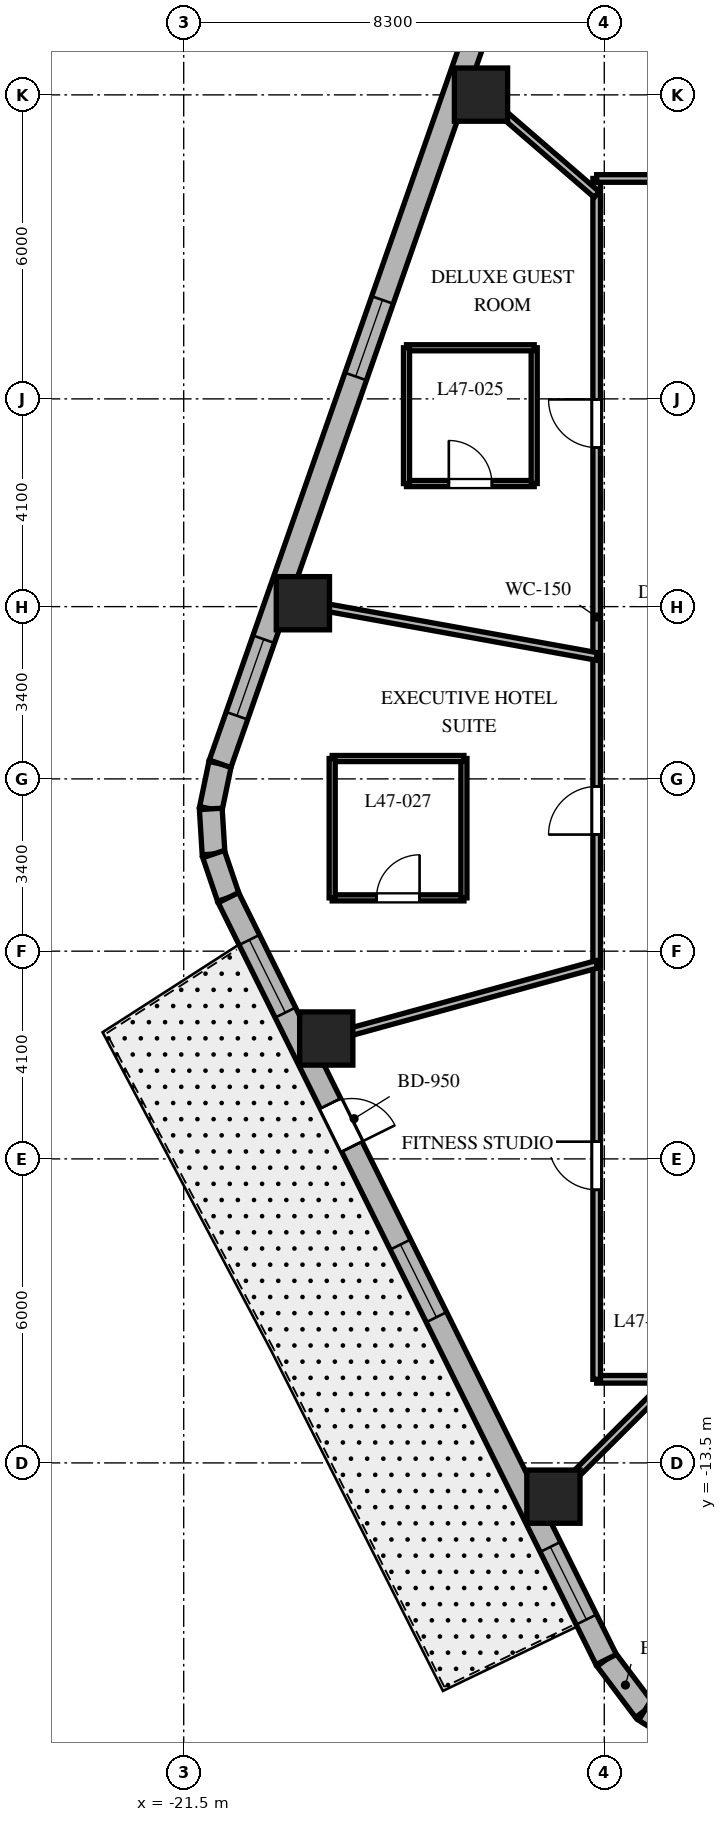
"""IFC4 building model, lengths in metres.
Left out: names, types, materials, properties, quantities, classifications, styles, units other than length and angle.
Written with IfcOpenShell. Run it as: python <this file> out.ifc"""

import sys

from ifc_helpers import new_model, si_unit, direction, frame, frame_2d, origin, origin_2d, place, context, subcontext, project, spatial, rectangle, extrude, element, fill, save


model = new_model("IFC4")
c1 = context("Model", 3, precision=1e-05, world=origin(), true_north=direction((0.0, 1.0)))
c2 = subcontext(c1, "Body", "Model", "MODEL_VIEW")
j1 = project(units=[si_unit("LENGTHUNIT", "METRE"), si_unit("PLANEANGLEUNIT", "RADIAN")], contexts=[c1])
p1 = place(None, origin())
s1 = spatial("IfcSite", under=j1, at=p1, CompositionType="ELEMENT")
p2 = place(p1, origin())
s2 = spatial("IfcBuilding", under=s1, at=p2, CompositionType="ELEMENT")
p3 = place(p2, frame((0.0, 0.0, 190.4)))
s3 = spatial("IfcBuildingStorey", under=s2, at=p3, CompositionType="ELEMENT", Elevation=190.4)
for number, where, z_axis, x_axis in (
    (1, (-15.633, 13.505, 0.0), (0.0, 0.0, 1.0), (1.0, 0.0, 0.0)),
    (2, (-19.148, 3.467, 0.0), (0.0, 0.0, 1.0), (1.0, 0.0, 0.0)),
    (3, (-18.687, -5.124, 0.0), (0.0, 0.0, 1.0), (1.0, 0.0, 0.0)),
    (4, (-14.204, -14.166, 0.0), (0.0, 0.0, 1.0), (1.0, 0.0, 0.0)),
):
    element("IfcColumn", number, at=place(p3, frame(where, z_axis=z_axis, x_axis=x_axis)), inside=s3, PredefinedType="COLUMN", context=c2, shape_type="SweptSolid", body=[
        extrude(rectangle(XDim=1.05, YDim=1.05, at=origin_2d()), origin(), (0.0, 0.0, 1.0), 3.7),
    ])
p4 = place(p3, frame((-13.162, -17.381, 0.0), z_axis=(0.0, 0.0, 1.0), x_axis=(0.601515770517, -0.798860925205, 0.0)))
e5 = element("IfcWall", 5, at=p4, inside=s3, PredefinedType="SOLIDWALL", context=c2, shape_type="SweptSolid", body=[
    extrude(rectangle(XDim=1.262, YDim=0.45, at=frame_2d((0.631, 0.0))), origin(), (0.0, 0.0, 1.0), 3.4),
])
p5 = place(p3, frame((-12.403, -18.389, 0.0), z_axis=(0.0, 0.0, 1.0), x_axis=(0.849795170926, -0.527113049991, 0.0)))
e6 = element("IfcWall", 6, at=p5, inside=s3, PredefinedType="SOLIDWALL", context=c2, shape_type="SweptSolid", body=[
    extrude(rectangle(XDim=1.241, YDim=0.45, at=frame_2d((0.62, 0.0))), origin(), (0.0, 0.0, 1.0), 3.4),
])
p6 = place(p3, frame((-20.782, 0.298, 0.0), z_axis=(0.0, 0.0, 1.0), x_axis=(-0.202570068411, -0.979267771033, 0.0)))
e7 = element("IfcWall", 7, at=p6, inside=s3, PredefinedType="SOLIDWALL", context=c2, shape_type="SweptSolid", body=[
    extrude(rectangle(XDim=0.909, YDim=0.45, at=frame_2d((0.454, 0.0))), origin(), (0.0, 0.0, 1.0), 3.4),
])
p7 = place(p3, frame((-20.966, -0.592, 0.0), z_axis=(0.0, 0.0, 1.0), x_axis=(0.061748898935, -0.998091715966, 0.0)))
e8 = element("IfcWall", 8, at=p7, inside=s3, PredefinedType="SOLIDWALL", context=c2, shape_type="SweptSolid", body=[
    extrude(rectangle(XDim=0.894, YDim=0.45, at=frame_2d((0.447, 0.0))), origin(), (0.0, 0.0, 1.0), 3.4),
])
p8 = place(p3, frame((-20.911, -1.484, 0.0), z_axis=(0.0, 0.0, 1.0), x_axis=(0.321623334353, -0.946867694453, 0.0)))
e9 = element("IfcWall", 9, at=p8, inside=s3, PredefinedType="SOLIDWALL", context=c2, shape_type="SweptSolid", body=[
    extrude(rectangle(XDim=0.909, YDim=0.45, at=frame_2d((0.454, 0.0))), origin(), (0.0, 0.0, 1.0), 3.4),
])
p9 = place(p3, frame((-14.937, 16.993, 0.0), z_axis=(0.0, 0.0, 1.0), x_axis=(-0.330431575061, -0.943829949834, 0.0)))
e10 = element("IfcWall", 10, at=p9, inside=s3, PredefinedType="SOLIDWALL", context=c2, shape_type="SweptSolid", body=[
    extrude(rectangle(XDim=17.689, YDim=0.45, at=frame_2d((8.844, 0.0))), origin(), (0.0, 0.0, 1.0), 3.4),
])
p10 = place(p9, frame((0.95, 0.0, 0.8)))
e11 = element("IfcOpeningElement", 11, at=p10, cuts=e10, PredefinedType="OPENING", context=c2, shape_type="SweptSolid", body=[
    extrude(rectangle(XDim=1.6, YDim=1.75, at=frame_2d((0.8, 0.875))), frame((0.0, 0.235, 0.0), z_axis=(0.0, -1.0, 0.0), x_axis=(1.0, 0.0, 0.0)), (0.0, 0.0, 1.0), 0.47),
])
p11 = place(p9, frame((7.99, 0.0, 0.8)))
e12 = element("IfcOpeningElement", 12, at=p11, cuts=e10, PredefinedType="OPENING", context=c2, shape_type="SweptSolid", body=[
    extrude(rectangle(XDim=1.6, YDim=1.75, at=frame_2d((0.8, 0.875))), frame((0.0, 0.235, 0.0), z_axis=(0.0, -1.0, 0.0), x_axis=(1.0, 0.0, 0.0)), (0.0, 0.0, 1.0), 0.47),
])
p12 = place(p9, frame((15.084, 0.0, 0.8)))
e13 = element("IfcOpeningElement", 13, at=p12, cuts=e10, PredefinedType="OPENING", context=c2, shape_type="SweptSolid", body=[
    extrude(rectangle(XDim=1.6, YDim=1.75, at=frame_2d((0.8, 0.875))), frame((0.0, 0.235, 0.0), z_axis=(0.0, -1.0, 0.0), x_axis=(1.0, 0.0, 0.0)), (0.0, 0.0, 1.0), 0.47),
])
p13 = place(p3, frame((-20.618, -2.344, 0.0), z_axis=(0.0, 0.0, 1.0), x_axis=(0.444243691097, -0.895905990002, 0.0)))
e14 = element("IfcWall", 14, at=p13, inside=s3, PredefinedType="SOLIDWALL", context=c2, shape_type="SweptSolid", body=[
    extrude(rectangle(XDim=16.784, YDim=0.45, at=frame_2d((8.392, 0.0))), origin(), (0.0, 0.0, 1.0), 3.4),
])
p14 = place(p13, frame((4.535, 0.0, 0.0)))
e15 = element("IfcOpeningElement", 15, at=p14, cuts=e14, PredefinedType="OPENING", context=c2, shape_type="SweptSolid", body=[
    extrude(rectangle(XDim=0.95, YDim=2.15, at=frame_2d((0.475, 1.075))), frame((0.0, 0.235, 0.0), z_axis=(0.0, -1.0, 0.0), x_axis=(1.0, 0.0, 0.0)), (0.0, 0.0, 1.0), 0.47),
])
p15 = place(p13, frame((0.931, 0.0, 0.8)))
e16 = element("IfcOpeningElement", 16, at=p15, cuts=e14, PredefinedType="OPENING", context=c2, shape_type="SweptSolid", body=[
    extrude(rectangle(XDim=1.6, YDim=1.75, at=frame_2d((0.8, 0.875))), frame((0.0, 0.235, 0.0), z_axis=(0.0, -1.0, 0.0), x_axis=(1.0, 0.0, 0.0)), (0.0, 0.0, 1.0), 0.47),
])
p16 = place(p13, frame((7.642, 0.0, 0.8)))
e17 = element("IfcOpeningElement", 17, at=p16, cuts=e14, PredefinedType="OPENING", context=c2, shape_type="SweptSolid", body=[
    extrude(rectangle(XDim=1.6, YDim=1.75, at=frame_2d((0.8, 0.875))), frame((0.0, 0.235, 0.0), z_axis=(0.0, -1.0, 0.0), x_axis=(1.0, 0.0, 0.0)), (0.0, 0.0, 1.0), 0.47),
])
p17 = place(p13, frame((14.303, 0.0, 0.8)))
e18 = element("IfcOpeningElement", 18, at=p17, cuts=e14, PredefinedType="OPENING", context=c2, shape_type="SweptSolid", body=[
    extrude(rectangle(XDim=1.6, YDim=1.75, at=frame_2d((0.8, 0.875))), frame((0.0, 0.235, 0.0), z_axis=(0.0, -1.0, 0.0), x_axis=(1.0, 0.0, 0.0)), (0.0, 0.0, 1.0), 0.47),
])
p18 = place(p3, frame((13.35, -11.85, 0.0), z_axis=(0.0, 0.0, 1.0), x_axis=(-1.0, 0.0, 0.0)))
e19 = element("IfcWall", 19, at=p18, inside=s3, PredefinedType="PARTITIONING", context=c2, shape_type="SweptSolid", body=[
    extrude(rectangle(XDim=26.7, YDim=0.15, at=frame_2d((13.35, 0.0))), origin(), (0.0, 0.0, 1.0), 2.84),
])
p19 = place(p18, frame((22.459, 0.0, 0.0)))
e20 = element("IfcOpeningElement", 20, at=p19, cuts=e19, PredefinedType="OPENING", context=c2, shape_type="SweptSolid", body=[
    extrude(rectangle(XDim=0.9, YDim=2.03, at=frame_2d((0.45, 1.015))), frame((0.0, 0.085, 0.0), z_axis=(0.0, -1.0, 0.0), x_axis=(1.0, 0.0, 0.0)), (0.0, 0.0, 1.0), 0.17),
])
p20 = place(p18, frame((18.304, 0.0, 0.0)))
e21 = element("IfcOpeningElement", 21, at=p20, cuts=e19, PredefinedType="OPENING", context=c2, shape_type="SweptSolid", body=[
    extrude(rectangle(XDim=0.9, YDim=2.03, at=frame_2d((0.45, 1.015))), frame((0.0, 0.085, 0.0), z_axis=(0.0, -1.0, 0.0), x_axis=(1.0, 0.0, 0.0)), (0.0, 0.0, 1.0), 0.17),
])
p21 = place(p18, frame((12.362, 0.0, 0.0)))
e22 = element("IfcOpeningElement", 22, at=p21, cuts=e19, PredefinedType="OPENING", context=c2, shape_type="SweptSolid", body=[
    extrude(rectangle(XDim=0.95, YDim=2.03, at=frame_2d((0.475, 1.015))), frame((0.0, 0.085, 0.0), z_axis=(0.0, -1.0, 0.0), x_axis=(1.0, 0.0, 0.0)), (0.0, 0.0, 1.0), 0.17),
])
p22 = place(p18, frame((3.995, 0.0, 0.0)))
e23 = element("IfcOpeningElement", 23, at=p22, cuts=e19, PredefinedType="OPENING", context=c2, shape_type="SweptSolid", body=[
    extrude(rectangle(XDim=0.95, YDim=2.03, at=frame_2d((0.475, 1.015))), frame((0.0, 0.085, 0.0), z_axis=(0.0, -1.0, 0.0), x_axis=(1.0, 0.0, 0.0)), (0.0, 0.0, 1.0), 0.17),
])
p23 = place(p3, frame((-13.35, -11.85, 0.0), z_axis=(0.0, 0.0, 1.0), x_axis=(0.0, 1.0, 0.0)))
e24 = element("IfcWall", 24, at=p23, inside=s3, PredefinedType="PARTITIONING", context=c2, shape_type="SweptSolid", body=[
    extrude(rectangle(XDim=23.7, YDim=0.15, at=frame_2d((11.85, 0.0))), origin(), (0.0, 0.0, 1.0), 2.84),
])
p24 = place(p23, frame((18.389, 0.0, 0.0)))
e25 = element("IfcOpeningElement", 25, at=p24, cuts=e24, PredefinedType="OPENING", context=c2, shape_type="SweptSolid", body=[
    extrude(rectangle(XDim=0.95, YDim=2.03, at=frame_2d((0.475, 1.015))), frame((0.0, 0.085, 0.0), z_axis=(0.0, -1.0, 0.0), x_axis=(1.0, 0.0, 0.0)), (0.0, 0.0, 1.0), 0.17),
])
p25 = place(p23, frame((10.751, 0.0, 0.0)))
e26 = element("IfcOpeningElement", 26, at=p25, cuts=e24, PredefinedType="OPENING", context=c2, shape_type="SweptSolid", body=[
    extrude(rectangle(XDim=0.95, YDim=2.03, at=frame_2d((0.475, 1.015))), frame((0.0, 0.085, 0.0), z_axis=(0.0, -1.0, 0.0), x_axis=(1.0, 0.0, 0.0)), (0.0, 0.0, 1.0), 0.17),
])
p26 = place(p23, frame((3.74, 0.0, 0.0)))
e27 = element("IfcOpeningElement", 27, at=p26, cuts=e24, PredefinedType="OPENING", context=c2, shape_type="SweptSolid", body=[
    extrude(rectangle(XDim=0.95, YDim=2.03, at=frame_2d((0.475, 1.015))), frame((0.0, 0.085, 0.0), z_axis=(0.0, -1.0, 0.0), x_axis=(1.0, 0.0, 0.0)), (0.0, 0.0, 1.0), 0.17),
])
p27 = place(p3, frame((-13.35, 11.85, 0.0), z_axis=(0.0, 0.0, 1.0), x_axis=(1.0, 0.0, 0.0)))
e28 = element("IfcWall", 28, at=p27, inside=s3, PredefinedType="PARTITIONING", context=c2, shape_type="SweptSolid", body=[
    extrude(rectangle(XDim=26.7, YDim=0.15, at=frame_2d((13.35, 0.0))), origin(), (0.0, 0.0, 1.0), 2.84),
])
p28 = place(p27, frame((20.682, 0.0, 0.0)))
e29 = element("IfcOpeningElement", 29, at=p28, cuts=e28, PredefinedType="OPENING", context=c2, shape_type="SweptSolid", body=[
    extrude(rectangle(XDim=0.95, YDim=2.03, at=frame_2d((0.475, 1.015))), frame((0.0, 0.085, 0.0), z_axis=(0.0, -1.0, 0.0), x_axis=(1.0, 0.0, 0.0)), (0.0, 0.0, 1.0), 0.17),
])
p29 = place(p27, frame((12.362, 0.0, 0.0)))
e30 = element("IfcOpeningElement", 30, at=p29, cuts=e28, PredefinedType="OPENING", context=c2, shape_type="SweptSolid", body=[
    extrude(rectangle(XDim=0.95, YDim=2.03, at=frame_2d((0.475, 1.015))), frame((0.0, 0.085, 0.0), z_axis=(0.0, -1.0, 0.0), x_axis=(1.0, 0.0, 0.0)), (0.0, 0.0, 1.0), 0.17),
])
p30 = place(p27, frame((3.995, 0.0, 0.0)))
e31 = element("IfcOpeningElement", 31, at=p30, cuts=e28, PredefinedType="OPENING", context=c2, shape_type="SweptSolid", body=[
    extrude(rectangle(XDim=0.95, YDim=2.03, at=frame_2d((0.475, 1.015))), frame((0.0, 0.085, 0.0), z_axis=(0.0, -1.0, 0.0), x_axis=(1.0, 0.0, 0.0)), (0.0, 0.0, 1.0), 0.17),
])
p31 = place(p3, frame((-13.35, 11.533, 0.0), z_axis=(0.0, 0.0, 1.0), x_axis=(-0.756711647314, 0.65374879183, 0.0)))
e32 = element("IfcWall", 32, at=p31, inside=s3, PredefinedType="PARTITIONING", context=c2, shape_type="SweptSolid", body=[
    extrude(rectangle(XDim=3.55, YDim=0.15, at=frame_2d((1.775, 0.0))), origin(), (0.0, 0.0, 1.0), 2.64),
])
p32 = place(p3, frame((-13.35, 2.417, 0.0), z_axis=(0.0, 0.0, 1.0), x_axis=(-0.98399796473, 0.178179699761, 0.0)))
e33 = element("IfcWall", 33, at=p32, inside=s3, PredefinedType="PARTITIONING", context=c2, shape_type="SweptSolid", body=[
    extrude(rectangle(XDim=6.393, YDim=0.15, at=frame_2d((3.197, 0.0))), origin(), (0.0, 0.0, 1.0), 2.64),
])
p33 = place(p3, frame((-13.35, -3.661, 0.0), z_axis=(0.0, 0.0, 1.0), x_axis=(-0.964397145454, -0.264458211898, 0.0)))
e34 = element("IfcWall", 34, at=p33, inside=s3, PredefinedType="PARTITIONING", context=c2, shape_type="SweptSolid", body=[
    extrude(rectangle(XDim=6.039, YDim=0.15, at=frame_2d((3.019, 0.0))), origin(), (0.0, 0.0, 1.0), 2.64),
])
p34 = place(p3, frame((-11.882, -11.85, 0.0), z_axis=(0.0, 0.0, 1.0), x_axis=(-0.708037373639, -0.706174962407, 0.0)))
e35 = element("IfcWall", 35, at=p34, inside=s3, PredefinedType="PARTITIONING", context=c2, shape_type="SweptSolid", body=[
    extrude(rectangle(XDim=3.802, YDim=0.15, at=frame_2d((1.901, 0.0))), origin(), (0.0, 0.0, 1.0), 2.64),
])
p35 = place(p3, frame((-17.103, 5.829, 0.0), z_axis=(0.0, 0.0, 1.0), x_axis=(1.0, 0.0, 0.0)))
e36 = element("IfcWall", 36, at=p35, inside=s3, PredefinedType="PARTITIONING", context=c2, shape_type="SweptSolid", body=[
    extrude(rectangle(XDim=2.52, YDim=0.12, at=frame_2d((1.26, 0.0))), origin(), (0.0, 0.0, 1.0), 2.972),
])
p36 = place(p35, frame((0.835, 0.0, 0.0)))
e37 = element("IfcOpeningElement", 37, at=p36, cuts=e36, PredefinedType="OPENING", context=c2, shape_type="SweptSolid", body=[
    extrude(rectangle(XDim=0.85, YDim=2.03, at=frame_2d((0.425, 1.015))), frame((0.0, 0.07, 0.0), z_axis=(0.0, -1.0, 0.0), x_axis=(1.0, 0.0, 0.0)), (0.0, 0.0, 1.0), 0.14),
])
p37 = place(p3, frame((-14.583, 5.829, 0.0), z_axis=(0.0, 0.0, 1.0), x_axis=(0.0, 1.0, 0.0)))
e38 = element("IfcWall", 38, at=p37, inside=s3, PredefinedType="PARTITIONING", context=c2, shape_type="SweptSolid", body=[
    extrude(rectangle(XDim=2.68, YDim=0.12, at=frame_2d((1.34, 0.0))), origin(), (0.0, 0.0, 1.0), 2.972),
])
p38 = place(p3, frame((-14.583, 8.509, 0.0), z_axis=(0.0, 0.0, 1.0), x_axis=(-1.0, 0.0, 0.0)))
e39 = element("IfcWall", 39, at=p38, inside=s3, PredefinedType="PARTITIONING", context=c2, shape_type="SweptSolid", body=[
    extrude(rectangle(XDim=2.52, YDim=0.12, at=frame_2d((1.26, 0.0))), origin(), (0.0, 0.0, 1.0), 2.972),
])
p39 = place(p3, frame((-17.103, 8.509, 0.0), z_axis=(0.0, 0.0, 1.0), x_axis=(0.0, -1.0, 0.0)))
e40 = element("IfcWall", 40, at=p39, inside=s3, PredefinedType="PARTITIONING", context=c2, shape_type="SweptSolid", body=[
    extrude(rectangle(XDim=2.68, YDim=0.12, at=frame_2d((1.34, 0.0))), origin(), (0.0, 0.0, 1.0), 2.64),
])
p40 = place(p3, frame((-18.57, -2.348, 0.0), z_axis=(0.0, 0.0, 1.0), x_axis=(1.0, 0.0, 0.0)))
e41 = element("IfcWall", 41, at=p40, inside=s3, PredefinedType="PARTITIONING", context=c2, shape_type="SweptSolid", body=[
    extrude(rectangle(XDim=2.6, YDim=0.12, at=frame_2d((1.3, 0.0))), origin(), (0.0, 0.0, 1.0), 3.4),
])
p41 = place(p40, frame((0.875, 0.0, 0.0)))
e42 = element("IfcOpeningElement", 42, at=p41, cuts=e41, PredefinedType="OPENING", context=c2, shape_type="SweptSolid", body=[
    extrude(rectangle(XDim=0.85, YDim=2.03, at=frame_2d((0.425, 1.015))), frame((0.0, 0.07, 0.0), z_axis=(0.0, -1.0, 0.0), x_axis=(1.0, 0.0, 0.0)), (0.0, 0.0, 1.0), 0.14),
])
p42 = place(p3, frame((-15.97, -2.348, 0.0), z_axis=(0.0, 0.0, 1.0), x_axis=(0.0, 1.0, 0.0)))
e43 = element("IfcWall", 43, at=p42, inside=s3, PredefinedType="PARTITIONING", context=c2, shape_type="SweptSolid", body=[
    extrude(rectangle(XDim=2.75, YDim=0.12, at=frame_2d((1.375, 0.0))), origin(), (0.0, 0.0, 1.0), 3.4),
])
p43 = place(p3, frame((-15.97, 0.402, 0.0), z_axis=(0.0, 0.0, 1.0), x_axis=(-1.0, 0.0, 0.0)))
e44 = element("IfcWall", 44, at=p43, inside=s3, PredefinedType="PARTITIONING", context=c2, shape_type="SweptSolid", body=[
    extrude(rectangle(XDim=2.6, YDim=0.12, at=frame_2d((1.3, 0.0))), origin(), (0.0, 0.0, 1.0), 3.4),
])
p44 = place(p3, frame((-18.57, 0.402, 0.0), z_axis=(0.0, 0.0, 1.0), x_axis=(0.0, -1.0, 0.0)))
e45 = element("IfcWall", 45, at=p44, inside=s3, PredefinedType="PARTITIONING", context=c2, shape_type="SweptSolid", body=[
    extrude(rectangle(XDim=2.75, YDim=0.12, at=frame_2d((1.375, 0.0))), origin(), (0.0, 0.0, 1.0), 2.64),
])
p45 = place(p11, origin())
e46 = element("IfcWindow", 46, at=p45, inside=s3, PartitioningType="SINGLE_PANEL", PredefinedType="WINDOW", context=c2, shape_type="SweptSolid", body=[
    extrude(rectangle(XDim=1.6, YDim=1.75, at=frame_2d((0.8, 0.875))), frame((0.0, 0.03, 0.0), z_axis=(0.0, -1.0, 0.0), x_axis=(1.0, 0.0, 0.0)), (0.0, 0.0, 1.0), 0.06),
])
fill(e12, e46)
p46 = place(p12, origin())
e47 = element("IfcWindow", 47, at=p46, inside=s3, PartitioningType="SINGLE_PANEL", PredefinedType="WINDOW", context=c2, shape_type="SweptSolid", body=[
    extrude(rectangle(XDim=1.6, YDim=1.75, at=frame_2d((0.8, 0.875))), frame((0.0, 0.03, 0.0), z_axis=(0.0, -1.0, 0.0), x_axis=(1.0, 0.0, 0.0)), (0.0, 0.0, 1.0), 0.06),
])
fill(e13, e47)
p47 = place(p14, origin())
e48 = element("IfcDoor", 48, at=p47, inside=s3, OperationType="SINGLE_SWING_RIGHT", PredefinedType="DOOR", context=c2, shape_type="SweptSolid", body=[
    extrude(rectangle(XDim=0.95, YDim=2.15, at=frame_2d((0.475, 1.075))), frame((0.0, 0.025, 0.0), z_axis=(0.0, -1.0, 0.0), x_axis=(1.0, 0.0, 0.0)), (0.0, 0.0, 1.0), 0.05),
])
fill(e15, e48)
p48 = place(p15, origin())
e49 = element("IfcWindow", 49, at=p48, inside=s3, PartitioningType="SINGLE_PANEL", PredefinedType="WINDOW", context=c2, shape_type="SweptSolid", body=[
    extrude(rectangle(XDim=1.6, YDim=1.75, at=frame_2d((0.8, 0.875))), frame((0.0, 0.03, 0.0), z_axis=(0.0, -1.0, 0.0), x_axis=(1.0, 0.0, 0.0)), (0.0, 0.0, 1.0), 0.06),
])
fill(e16, e49)
p49 = place(p16, origin())
e50 = element("IfcWindow", 50, at=p49, inside=s3, PartitioningType="SINGLE_PANEL", PredefinedType="WINDOW", context=c2, shape_type="SweptSolid", body=[
    extrude(rectangle(XDim=1.6, YDim=1.75, at=frame_2d((0.8, 0.875))), frame((0.0, 0.03, 0.0), z_axis=(0.0, -1.0, 0.0), x_axis=(1.0, 0.0, 0.0)), (0.0, 0.0, 1.0), 0.06),
])
fill(e17, e50)
p50 = place(p17, origin())
e51 = element("IfcWindow", 51, at=p50, inside=s3, PartitioningType="SINGLE_PANEL", PredefinedType="WINDOW", context=c2, shape_type="SweptSolid", body=[
    extrude(rectangle(XDim=1.6, YDim=1.75, at=frame_2d((0.8, 0.875))), frame((0.0, 0.03, 0.0), z_axis=(0.0, -1.0, 0.0), x_axis=(1.0, 0.0, 0.0)), (0.0, 0.0, 1.0), 0.06),
])
fill(e18, e51)
p51 = place(p24, origin())
e52 = element("IfcDoor", 52, at=p51, inside=s3, OperationType="SINGLE_SWING_RIGHT", PredefinedType="DOOR", context=c2, shape_type="SweptSolid", body=[
    extrude(rectangle(XDim=0.95, YDim=2.03, at=frame_2d((0.475, 1.015))), frame((0.0, 0.025, 0.0), z_axis=(0.0, -1.0, 0.0), x_axis=(1.0, 0.0, 0.0)), (0.0, 0.0, 1.0), 0.05),
])
fill(e25, e52)
p52 = place(p36, origin())
e53 = element("IfcDoor", 53, at=p52, inside=s3, OperationType="SINGLE_SWING_LEFT", PredefinedType="DOOR", context=c2, shape_type="SweptSolid", body=[
    extrude(rectangle(XDim=0.85, YDim=2.03, at=frame_2d((0.425, 1.015))), frame((0.0, 0.025, 0.0), z_axis=(0.0, -1.0, 0.0), x_axis=(1.0, 0.0, 0.0)), (0.0, 0.0, 1.0), 0.05),
])
fill(e37, e53)
p53 = place(p25, origin())
e54 = element("IfcDoor", 54, at=p53, inside=s3, OperationType="SINGLE_SWING_LEFT", PredefinedType="DOOR", context=c2, shape_type="SweptSolid", body=[
    extrude(rectangle(XDim=0.95, YDim=2.03, at=frame_2d((0.475, 1.015))), frame((0.0, 0.025, 0.0), z_axis=(0.0, -1.0, 0.0), x_axis=(1.0, 0.0, 0.0)), (0.0, 0.0, 1.0), 0.05),
])
fill(e26, e54)
p54 = place(p41, origin())
e55 = element("IfcDoor", 55, at=p54, inside=s3, OperationType="SINGLE_SWING_RIGHT", PredefinedType="DOOR", context=c2, shape_type="SweptSolid", body=[
    extrude(rectangle(XDim=0.85, YDim=2.03, at=frame_2d((0.425, 1.015))), frame((0.0, 0.025, 0.0), z_axis=(0.0, -1.0, 0.0), x_axis=(1.0, 0.0, 0.0)), (0.0, 0.0, 1.0), 0.05),
])
fill(e42, e55)
p55 = place(p26, origin())
e56 = element("IfcDoor", 56, at=p55, inside=s3, OperationType="SINGLE_SWING_RIGHT", PredefinedType="DOOR", context=c2, shape_type="SweptSolid", body=[
    extrude(rectangle(XDim=0.95, YDim=2.03, at=frame_2d((0.475, 1.015))), frame((0.0, 0.025, 0.0), z_axis=(0.0, -1.0, 0.0), x_axis=(1.0, 0.0, 0.0)), (0.0, 0.0, 1.0), 0.05),
])
fill(e27, e56)
save(model, sys.argv[1])
